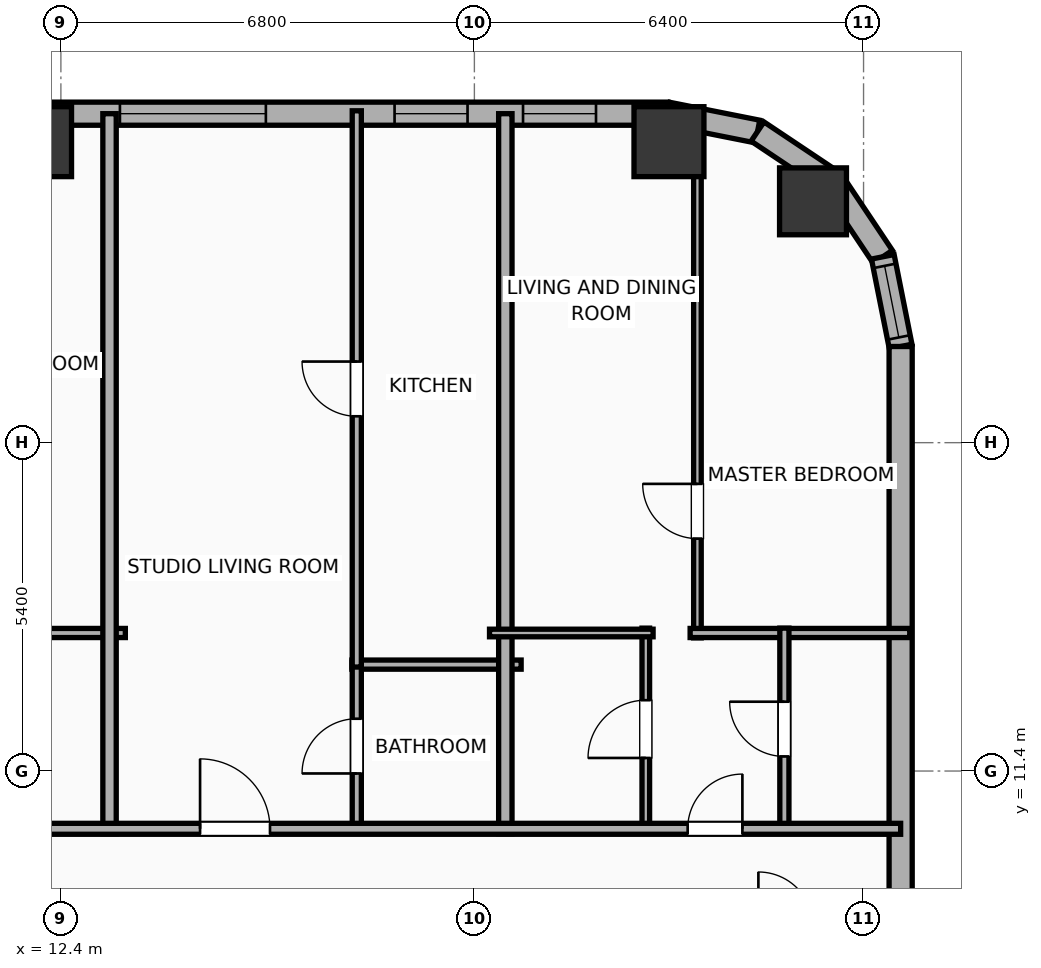
"""IFC4 building model, lengths in metres.
Left out: names, types, materials, properties, quantities, classifications, styles, units other than length and angle.
Written with IfcOpenShell. Run it as: python <this file> out.ifc"""

import sys

from ifc_helpers import new_model, si_unit, direction, frame, frame_2d, origin, origin_2d, place, context, subcontext, project, spatial, rectangle, hollow_rectangle, hollow_circle, extrude, element, fill, save


model = new_model("IFC4")
c1 = context("Model", 3, precision=1e-05, world=origin(), true_north=direction((0.0, 1.0)))
c2 = subcontext(c1, "Body", "Model", "MODEL_VIEW")
j1 = project(units=[si_unit("LENGTHUNIT", "METRE"), si_unit("PLANEANGLEUNIT", "RADIAN")], contexts=[c1])
p1 = place(None, origin())
s1 = spatial("IfcSite", under=j1, at=p1, CompositionType="ELEMENT")
p2 = place(p1, origin())
s2 = spatial("IfcBuilding", under=s1, at=p2, CompositionType="ELEMENT")
p3 = place(p2, frame((0.0, 0.0, 57.2)))
s3 = spatial("IfcBuildingStorey", under=s2, at=p3, CompositionType="ELEMENT", Elevation=57.2)
p4 = place(p3, frame((24.769, 20.769, 0.0), z_axis=(0.0, 0.0, 1.0), x_axis=(1.0, 0.0, 0.0)))
e1 = element("IfcColumn", 1, at=p4, inside=s3, PredefinedType="COLUMN", context=c2, shape_type="SweptSolid", body=[
    extrude(hollow_circle(Radius=0.55, WallThickness=0.036, at=origin_2d()), origin(), (0.0, 0.0, 1.0), 3.9),
])
for number, where, z_axis, x_axis in (
    (2, (22.4, 21.75, 0.0), (0.0, 0.0, 1.0), (1.0, 0.0, 0.0)),
    (3, (12.0, 21.75, 0.0), (0.0, 0.0, 1.0), (1.0, 0.0, 0.0)),
):
    element("IfcColumn", number, at=place(p3, frame(where, z_axis=z_axis, x_axis=x_axis)), inside=s3, PredefinedType="COLUMN", context=c2, shape_type="SweptSolid", body=[
        extrude(hollow_rectangle(XDim=1.15, YDim=1.15, WallThickness=0.04, at=origin_2d()), origin(), (0.0, 0.0, 1.0), 3.9),
    ])
p5 = place(p3, frame((-29.581, 22.21, 0.0), z_axis=(0.0, 0.0, 1.0), x_axis=(1.0, 0.0, 0.0)))
e4 = element("IfcWall", 4, at=p5, inside=s3, PredefinedType="ELEMENTEDWALL", context=c2, shape_type="SweptSolid", body=[
    extrude(rectangle(XDim=51.963, YDim=0.38, at=frame_2d((25.981, 0.0))), origin(), (0.0, 0.0, 1.0), 3.65),
])
p6 = place(p5, frame((6.61, 0.0, 0.75)))
e5 = element("IfcOpeningElement", 5, at=p6, cuts=e4, PredefinedType="OPENING", context=c2, shape_type="SweptSolid", body=[
    extrude(rectangle(XDim=2.4, YDim=2.1, at=frame_2d((1.2, 1.05))), frame((0.0, 0.2, 0.0), z_axis=(0.0, -1.0, 0.0), x_axis=(1.0, 0.0, 0.0)), (0.0, 0.0, 1.0), 0.4),
])
p7 = place(p5, frame((24.781, 0.0, 0.75)))
e6 = element("IfcOpeningElement", 6, at=p7, cuts=e4, PredefinedType="OPENING", context=c2, shape_type="SweptSolid", body=[
    extrude(rectangle(XDim=2.4, YDim=2.1, at=frame_2d((1.2, 1.05))), frame((0.0, 0.2, 0.0), z_axis=(0.0, -1.0, 0.0), x_axis=(1.0, 0.0, 0.0)), (0.0, 0.0, 1.0), 0.4),
])
p8 = place(p5, frame((42.952, 0.0, 0.75)))
e7 = element("IfcOpeningElement", 7, at=p8, cuts=e4, PredefinedType="OPENING", context=c2, shape_type="SweptSolid", body=[
    extrude(rectangle(XDim=2.4, YDim=2.1, at=frame_2d((1.2, 1.05))), frame((0.0, 0.2, 0.0), z_axis=(0.0, -1.0, 0.0), x_axis=(1.0, 0.0, 0.0)), (0.0, 0.0, 1.0), 0.4),
])
p9 = place(p5, frame((3.476, 0.0, 0.75)))
e8 = element("IfcOpeningElement", 8, at=p9, cuts=e4, PredefinedType="OPENING", context=c2, shape_type="SweptSolid", body=[
    extrude(rectangle(XDim=1.2, YDim=2.05, at=frame_2d((0.6, 1.025))), frame((0.0, 0.2, 0.0), z_axis=(0.0, -1.0, 0.0), x_axis=(1.0, 0.0, 0.0)), (0.0, 0.0, 1.0), 0.4),
])
p10 = place(p5, frame((11.236, 0.0, 0.75)))
e9 = element("IfcOpeningElement", 9, at=p10, cuts=e4, PredefinedType="OPENING", context=c2, shape_type="SweptSolid", body=[
    extrude(rectangle(XDim=1.2, YDim=2.05, at=frame_2d((0.6, 1.025))), frame((0.0, 0.2, 0.0), z_axis=(0.0, -1.0, 0.0), x_axis=(1.0, 0.0, 0.0)), (0.0, 0.0, 1.0), 0.4),
])
p11 = place(p5, frame((14.576, 0.0, 0.75)))
e10 = element("IfcOpeningElement", 10, at=p11, cuts=e4, PredefinedType="OPENING", context=c2, shape_type="SweptSolid", body=[
    extrude(rectangle(XDim=1.2, YDim=2.05, at=frame_2d((0.6, 1.025))), frame((0.0, 0.2, 0.0), z_axis=(0.0, -1.0, 0.0), x_axis=(1.0, 0.0, 0.0)), (0.0, 0.0, 1.0), 0.4),
])
p12 = place(p5, frame((18.276, 0.0, 0.75)))
e11 = element("IfcOpeningElement", 11, at=p12, cuts=e4, PredefinedType="OPENING", context=c2, shape_type="SweptSolid", body=[
    extrude(rectangle(XDim=1.2, YDim=2.05, at=frame_2d((0.6, 1.025))), frame((0.0, 0.2, 0.0), z_axis=(0.0, -1.0, 0.0), x_axis=(1.0, 0.0, 0.0)), (0.0, 0.0, 1.0), 0.4),
])
p13 = place(p5, frame((21.976, 0.0, 0.75)))
e12 = element("IfcOpeningElement", 12, at=p13, cuts=e4, PredefinedType="OPENING", context=c2, shape_type="SweptSolid", body=[
    extrude(rectangle(XDim=1.2, YDim=2.05, at=frame_2d((0.6, 1.025))), frame((0.0, 0.2, 0.0), z_axis=(0.0, -1.0, 0.0), x_axis=(1.0, 0.0, 0.0)), (0.0, 0.0, 1.0), 0.4),
])
p14 = place(p5, frame((29.136, 0.0, 0.75)))
e13 = element("IfcOpeningElement", 13, at=p14, cuts=e4, PredefinedType="OPENING", context=c2, shape_type="SweptSolid", body=[
    extrude(rectangle(XDim=1.2, YDim=2.05, at=frame_2d((0.6, 1.025))), frame((0.0, 0.2, 0.0), z_axis=(0.0, -1.0, 0.0), x_axis=(1.0, 0.0, 0.0)), (0.0, 0.0, 1.0), 0.4),
])
p15 = place(p5, frame((33.076, 0.0, 0.75)))
e14 = element("IfcOpeningElement", 14, at=p15, cuts=e4, PredefinedType="OPENING", context=c2, shape_type="SweptSolid", body=[
    extrude(rectangle(XDim=1.2, YDim=2.05, at=frame_2d((0.6, 1.025))), frame((0.0, 0.2, 0.0), z_axis=(0.0, -1.0, 0.0), x_axis=(1.0, 0.0, 0.0)), (0.0, 0.0, 1.0), 0.4),
])
p16 = place(p5, frame((36.776, 0.0, 0.75)))
e15 = element("IfcOpeningElement", 15, at=p16, cuts=e4, PredefinedType="OPENING", context=c2, shape_type="SweptSolid", body=[
    extrude(rectangle(XDim=1.2, YDim=2.05, at=frame_2d((0.6, 1.025))), frame((0.0, 0.2, 0.0), z_axis=(0.0, -1.0, 0.0), x_axis=(1.0, 0.0, 0.0)), (0.0, 0.0, 1.0), 0.4),
])
p17 = place(p5, frame((39.931, 0.0, 0.75)))
e16 = element("IfcOpeningElement", 16, at=p17, cuts=e4, PredefinedType="OPENING", context=c2, shape_type="SweptSolid", body=[
    extrude(rectangle(XDim=0.85, YDim=2.05, at=frame_2d((0.425, 1.025))), frame((0.0, 0.2, 0.0), z_axis=(0.0, -1.0, 0.0), x_axis=(1.0, 0.0, 0.0)), (0.0, 0.0, 1.0), 0.4),
])
p18 = place(p5, frame((47.469, 0.0, 0.75)))
e17 = element("IfcOpeningElement", 17, at=p18, cuts=e4, PredefinedType="OPENING", context=c2, shape_type="SweptSolid", body=[
    extrude(rectangle(XDim=1.2, YDim=2.05, at=frame_2d((0.6, 1.025))), frame((0.0, 0.2, 0.0), z_axis=(0.0, -1.0, 0.0), x_axis=(1.0, 0.0, 0.0)), (0.0, 0.0, 1.0), 0.4),
])
p19 = place(p5, frame((49.581, 0.0, 0.75)))
e18 = element("IfcOpeningElement", 18, at=p19, cuts=e4, PredefinedType="OPENING", context=c2, shape_type="SweptSolid", body=[
    extrude(rectangle(XDim=1.2, YDim=2.05, at=frame_2d((0.6, 1.025))), frame((0.0, 0.2, 0.0), z_axis=(0.0, -1.0, 0.0), x_axis=(1.0, 0.0, 0.0)), (0.0, 0.0, 1.0), 0.4),
])
p20 = place(p3, frame((22.381, 22.21, 0.0), z_axis=(0.0, 0.0, 1.0), x_axis=(0.980786132421, -0.195086038585, 0.0)))
e19 = element("IfcWall", 19, at=p20, inside=s3, PredefinedType="ELEMENTEDWALL", context=c2, shape_type="SweptSolid", body=[
    extrude(rectangle(XDim=1.504, YDim=0.38, at=frame_2d((0.752, 0.0))), origin(), (0.0, 0.0, 1.0), 3.65),
])
for number, where, z_axis, x_axis in (
    (20, (23.857, 21.917, 0.0), (0.0, 0.0, 1.0), (0.831, -0.556, 0.0)),
    (21, (25.091, 21.091, 0.0), (0.0, 0.0, 1.0), (0.556, -0.831, 0.0)),
):
    element("IfcWall", number, at=place(p3, frame(where, z_axis=z_axis, x_axis=x_axis)), inside=s3, PredefinedType="ELEMENTEDWALL", context=c2, shape_type="SweptSolid", body=[
        extrude(rectangle(XDim=1.485, YDim=0.38, at=frame_2d((0.743, 0.0))), origin(), (0.0, 0.0, 1.0), 3.65),
    ])
p21 = place(p3, frame((25.917, 19.857, 0.0), z_axis=(0.0, 0.0, 1.0), x_axis=(0.195086038585, -0.980786132421, 0.0)))
e22 = element("IfcWall", 22, at=p21, inside=s3, PredefinedType="ELEMENTEDWALL", context=c2, shape_type="SweptSolid", body=[
    extrude(rectangle(XDim=1.504, YDim=0.38, at=frame_2d((0.752, 0.0))), origin(), (0.0, 0.0, 1.0), 3.65),
])
p22 = place(p21, frame((0.152, 0.0, 0.75)))
e23 = element("IfcOpeningElement", 23, at=p22, cuts=e22, PredefinedType="OPENING", context=c2, shape_type="SweptSolid", body=[
    extrude(rectangle(XDim=1.2, YDim=2.05, at=frame_2d((0.6, 1.025))), frame((0.0, 0.2, 0.0), z_axis=(0.0, -1.0, 0.0), x_axis=(1.0, 0.0, 0.0)), (0.0, 0.0, 1.0), 0.4),
])
p23 = place(p3, frame((26.21, 18.381, 0.0), z_axis=(0.0, 0.0, 1.0), x_axis=(0.0, -1.0, 0.0)))
e24 = element("IfcWall", 24, at=p23, inside=s3, PredefinedType="ELEMENTEDWALL", context=c2, shape_type="SweptSolid", body=[
    extrude(rectangle(XDim=36.763, YDim=0.38, at=frame_2d((18.381, 0.0))), origin(), (0.0, 0.0, 1.0), 3.65),
])
p24 = place(p23, frame((33.362, 0.0, 0.75)))
e25 = element("IfcOpeningElement", 25, at=p24, cuts=e24, PredefinedType="OPENING", context=c2, shape_type="SweptSolid", body=[
    extrude(rectangle(XDim=1.2, YDim=2.05, at=frame_2d((0.6, 1.025))), frame((0.0, 0.2, 0.0), z_axis=(0.0, -1.0, 0.0), x_axis=(1.0, 0.0, 0.0)), (0.0, 0.0, 1.0), 0.4),
])
p25 = place(p3, frame((9.67, 13.67, 0.0), z_axis=(0.0, 0.0, 1.0), x_axis=(1.0, 0.0, 0.0)))
e26 = element("IfcWall", 26, at=p25, inside=s3, PredefinedType="PLUMBINGWALL", context=c2, shape_type="SweptSolid", body=[
    extrude(rectangle(XDim=3.79, YDim=0.15, at=frame_2d((1.895, 0.0))), origin(), (0.0, 0.0, 1.0), 3.65),
])
p26 = place(p3, frame((13.2, 10.37, 0.0), z_axis=(0.0, 0.0, 1.0), x_axis=(0.0, 1.0, 0.0)))
e27 = element("IfcWall", 27, at=p26, inside=s3, PredefinedType="PARTITIONING", context=c2, shape_type="SweptSolid", body=[
    extrude(rectangle(XDim=11.84, YDim=0.22, at=frame_2d((5.92, 0.0))), origin(), (0.0, 0.0, 1.0), 3.65),
])
p27 = place(p3, frame((17.186, 13.15, 0.0), z_axis=(0.0, 0.0, 1.0), x_axis=(1.0, 0.0, 0.0)))
e28 = element("IfcWall", 28, at=p27, inside=s3, PredefinedType="PLUMBINGWALL", context=c2, shape_type="SweptSolid", body=[
    extrude(rectangle(XDim=2.783, YDim=0.15, at=frame_2d((1.392, 0.0))), origin(), (0.0, 0.0, 1.0), 3.65),
])
p28 = place(p3, frame((17.266, 10.43, 0.0), z_axis=(0.0, 0.0, 1.0), x_axis=(0.0, 1.0, 0.0)))
e29 = element("IfcWall", 29, at=p28, inside=s3, PredefinedType="PLUMBINGWALL", context=c2, shape_type="SweptSolid", body=[
    extrude(rectangle(XDim=2.76, YDim=0.15, at=frame_2d((1.38, 0.0))), origin(), (0.0, 0.0, 1.0), 3.65),
])
p29 = place(p28, frame((0.93, 0.0, 0.0)))
e30 = element("IfcOpeningElement", 30, at=p29, cuts=e29, PredefinedType="OPENING", context=c2, shape_type="SweptSolid", body=[
    extrude(rectangle(XDim=0.9, YDim=2.05, at=frame_2d((0.45, 1.025))), frame((0.0, 0.085, 0.0), z_axis=(0.0, -1.0, 0.0), x_axis=(1.0, 0.0, 0.0)), (0.0, 0.0, 1.0), 0.17),
])
p30 = place(p3, frame((17.266, 13.11, 0.0), z_axis=(0.0, 0.0, 1.0), x_axis=(0.0, 1.0, 0.0)))
e31 = element("IfcWall", 31, at=p30, inside=s3, PredefinedType="PLUMBINGWALL", context=c2, shape_type="SweptSolid", body=[
    extrude(rectangle(XDim=9.147, YDim=0.15, at=frame_2d((4.574, 0.0))), origin(), (0.0, 0.0, 1.0), 3.65),
])
p31 = place(p30, frame((4.124, 0.0, 0.0)))
e32 = element("IfcOpeningElement", 32, at=p31, cuts=e31, PredefinedType="OPENING", context=c2, shape_type="SweptSolid", body=[
    extrude(rectangle(XDim=0.9, YDim=2.05, at=frame_2d((0.45, 1.025))), frame((0.0, 0.085, 0.0), z_axis=(0.0, -1.0, 0.0), x_axis=(1.0, 0.0, 0.0)), (0.0, 0.0, 1.0), 0.17),
])
p32 = place(p3, frame((19.709, 10.37, 0.0), z_axis=(0.0, 0.0, 1.0), x_axis=(0.0, 1.0, 0.0)))
e33 = element("IfcWall", 33, at=p32, inside=s3, PredefinedType="PARTITIONING", context=c2, shape_type="SweptSolid", body=[
    extrude(rectangle(XDim=11.84, YDim=0.22, at=frame_2d((5.92, 0.0))), origin(), (0.0, 0.0, 1.0), 3.65),
])
p33 = place(p3, frame((22.868, 13.59, 0.0), z_axis=(0.0, 0.0, 1.0), x_axis=(0.0, 1.0, 0.0)))
e34 = element("IfcWall", 34, at=p33, inside=s3, PredefinedType="PARTITIONING", context=c2, shape_type="SweptSolid", body=[
    extrude(rectangle(XDim=8.676, YDim=0.125, at=frame_2d((4.338, 0.0))), origin(), (0.0, 0.0, 1.0), 2.94),
])
p34 = place(p33, frame((1.632, 0.0, 0.0)))
e35 = element("IfcOpeningElement", 35, at=p34, cuts=e34, PredefinedType="OPENING", context=c2, shape_type="SweptSolid", body=[
    extrude(rectangle(XDim=0.9, YDim=2.05, at=frame_2d((0.45, 1.025))), frame((0.0, 0.073, 0.0), z_axis=(0.0, -1.0, 0.0), x_axis=(1.0, 0.0, 0.0)), (0.0, 0.0, 1.0), 0.145),
])
p35 = place(p3, frame((22.748, 13.67, 0.0), z_axis=(0.0, 0.0, 1.0), x_axis=(1.0, 0.0, 0.0)))
e36 = element("IfcWall", 36, at=p35, inside=s3, PredefinedType="PLUMBINGWALL", context=c2, shape_type="SweptSolid", body=[
    extrude(rectangle(XDim=3.612, YDim=0.15, at=frame_2d((1.806, 0.0))), origin(), (0.0, 0.0, 1.0), 3.65),
])
p36 = place(p3, frame((22.019, 10.43, 0.0), z_axis=(0.0, 0.0, 1.0), x_axis=(0.0, 1.0, 0.0)))
e37 = element("IfcWall", 37, at=p36, inside=s3, PredefinedType="PARTITIONING", context=c2, shape_type="SweptSolid", body=[
    extrude(rectangle(XDim=3.32, YDim=0.125, at=frame_2d((1.66, 0.0))), origin(), (0.0, 0.0, 1.0), 3.65),
])
p37 = place(p36, frame((1.185, 0.0, 0.0)))
e38 = element("IfcOpeningElement", 38, at=p37, cuts=e37, PredefinedType="OPENING", context=c2, shape_type="SweptSolid", body=[
    extrude(rectangle(XDim=0.95, YDim=2.05, at=frame_2d((0.475, 1.025))), frame((0.0, 0.073, 0.0), z_axis=(0.0, -1.0, 0.0), x_axis=(1.0, 0.0, 0.0)), (0.0, 0.0, 1.0), 0.145),
])
p38 = place(p3, frame((19.449, 13.67, 0.0), z_axis=(0.0, 0.0, 1.0), x_axis=(1.0, 0.0, 0.0)))
e39 = element("IfcWall", 39, at=p38, inside=s3, PredefinedType="PARTITIONING", context=c2, shape_type="SweptSolid", body=[
    extrude(rectangle(XDim=2.69, YDim=0.125, at=frame_2d((1.345, 0.0))), origin(), (0.0, 0.0, 1.0), 3.65),
])
p39 = place(p3, frame((24.298, 10.43, 0.0), z_axis=(0.0, 0.0, 1.0), x_axis=(0.0, 1.0, 0.0)))
e40 = element("IfcWall", 40, at=p39, inside=s3, PredefinedType="PLUMBINGWALL", context=c2, shape_type="SweptSolid", body=[
    extrude(rectangle(XDim=3.32, YDim=0.15, at=frame_2d((1.66, 0.0))), origin(), (0.0, 0.0, 1.0), 3.65),
])
p40 = place(p39, frame((1.21, 0.0, 0.0)))
e41 = element("IfcOpeningElement", 41, at=p40, cuts=e40, PredefinedType="OPENING", context=c2, shape_type="SweptSolid", body=[
    extrude(rectangle(XDim=0.9, YDim=2.05, at=frame_2d((0.45, 1.025))), frame((0.0, 0.085, 0.0), z_axis=(0.0, -1.0, 0.0), x_axis=(1.0, 0.0, 0.0)), (0.0, 0.0, 1.0), 0.17),
])
p41 = place(p3, frame((-33.41, 10.45, 0.0), z_axis=(0.0, 0.0, 1.0), x_axis=(1.0, 0.0, 0.0)))
e42 = element("IfcWall", 42, at=p41, inside=s3, PredefinedType="PARTITIONING", context=c2, shape_type="SweptSolid", body=[
    extrude(rectangle(XDim=59.62, YDim=0.18, at=frame_2d((29.81, 0.0))), origin(), (0.0, 0.0, 1.0), 3.65),
])
p42 = place(p41, frame((4.529, 0.0, 0.0)))
e43 = element("IfcOpeningElement", 43, at=p42, cuts=e42, PredefinedType="OPENING", context=c2, shape_type="SweptSolid", body=[
    extrude(rectangle(XDim=1.15, YDim=2.05, at=frame_2d((0.575, 1.025))), frame((0.0, 0.1, 0.0), z_axis=(0.0, -1.0, 0.0), x_axis=(1.0, 0.0, 0.0)), (0.0, 0.0, 1.0), 0.2),
])
p43 = place(p41, frame((12.899, 0.0, 0.0)))
e44 = element("IfcOpeningElement", 44, at=p43, cuts=e42, PredefinedType="OPENING", context=c2, shape_type="SweptSolid", body=[
    extrude(rectangle(XDim=1.15, YDim=2.05, at=frame_2d((0.575, 1.025))), frame((0.0, 0.1, 0.0), z_axis=(0.0, -1.0, 0.0), x_axis=(1.0, 0.0, 0.0)), (0.0, 0.0, 1.0), 0.2),
])
p44 = place(p41, frame((20.298, 0.0, 0.0)))
e45 = element("IfcOpeningElement", 45, at=p44, cuts=e42, PredefinedType="OPENING", context=c2, shape_type="SweptSolid", body=[
    extrude(rectangle(XDim=1.15, YDim=2.05, at=frame_2d((0.575, 1.025))), frame((0.0, 0.1, 0.0), z_axis=(0.0, -1.0, 0.0), x_axis=(1.0, 0.0, 0.0)), (0.0, 0.0, 1.0), 0.2),
])
p45 = place(p41, frame((27.703, 0.0, 0.0)))
e46 = element("IfcOpeningElement", 46, at=p45, cuts=e42, PredefinedType="OPENING", context=c2, shape_type="SweptSolid", body=[
    extrude(rectangle(XDim=1.15, YDim=2.05, at=frame_2d((0.575, 1.025))), frame((0.0, 0.1, 0.0), z_axis=(0.0, -1.0, 0.0), x_axis=(1.0, 0.0, 0.0)), (0.0, 0.0, 1.0), 0.2),
])
p46 = place(p41, frame((35.102, 0.0, 0.0)))
e47 = element("IfcOpeningElement", 47, at=p46, cuts=e42, PredefinedType="OPENING", context=c2, shape_type="SweptSolid", body=[
    extrude(rectangle(XDim=1.15, YDim=2.05, at=frame_2d((0.575, 1.025))), frame((0.0, 0.1, 0.0), z_axis=(0.0, -1.0, 0.0), x_axis=(1.0, 0.0, 0.0)), (0.0, 0.0, 1.0), 0.2),
])
p47 = place(p41, frame((42.5, 0.0, 0.0)))
e48 = element("IfcOpeningElement", 48, at=p47, cuts=e42, PredefinedType="OPENING", context=c2, shape_type="SweptSolid", body=[
    extrude(rectangle(XDim=1.15, YDim=2.05, at=frame_2d((0.575, 1.025))), frame((0.0, 0.1, 0.0), z_axis=(0.0, -1.0, 0.0), x_axis=(1.0, 0.0, 0.0)), (0.0, 0.0, 1.0), 0.2),
])
p48 = place(p41, frame((48.099, 0.0, 0.0)))
e49 = element("IfcOpeningElement", 49, at=p48, cuts=e42, PredefinedType="OPENING", context=c2, shape_type="SweptSolid", body=[
    extrude(rectangle(XDim=1.15, YDim=2.05, at=frame_2d((0.575, 1.025))), frame((0.0, 0.1, 0.0), z_axis=(0.0, -1.0, 0.0), x_axis=(1.0, 0.0, 0.0)), (0.0, 0.0, 1.0), 0.2),
])
p49 = place(p41, frame((56.117, 0.0, 0.0)))
e50 = element("IfcOpeningElement", 50, at=p49, cuts=e42, PredefinedType="OPENING", context=c2, shape_type="SweptSolid", body=[
    extrude(rectangle(XDim=0.9, YDim=2.05, at=frame_2d((0.45, 1.025))), frame((0.0, 0.1, 0.0), z_axis=(0.0, -1.0, 0.0), x_axis=(1.0, 0.0, 0.0)), (0.0, 0.0, 1.0), 0.2),
])
p50 = place(p8, origin())
e51 = element("IfcWindow", 51, at=p50, inside=s3, PartitioningType="SINGLE_PANEL", PredefinedType="WINDOW", context=c2, shape_type="SweptSolid", body=[
    extrude(rectangle(XDim=2.4, YDim=2.1, at=frame_2d((1.2, 1.05))), frame((0.0, 0.03, 0.0), z_axis=(0.0, -1.0, 0.0), x_axis=(1.0, 0.0, 0.0)), (0.0, 0.0, 1.0), 0.06),
])
fill(e7, e51)
p51 = place(p18, origin())
e52 = element("IfcWindow", 52, at=p51, inside=s3, PartitioningType="SINGLE_PANEL", PredefinedType="WINDOW", context=c2, shape_type="SweptSolid", body=[
    extrude(rectangle(XDim=1.2, YDim=2.05, at=frame_2d((0.6, 1.025))), frame((0.0, 0.03, 0.0), z_axis=(0.0, -1.0, 0.0), x_axis=(1.0, 0.0, 0.0)), (0.0, 0.0, 1.0), 0.06),
])
fill(e17, e52)
p52 = place(p19, origin())
e53 = element("IfcWindow", 53, at=p52, inside=s3, PartitioningType="SINGLE_PANEL", PredefinedType="WINDOW", context=c2, shape_type="SweptSolid", body=[
    extrude(rectangle(XDim=1.2, YDim=2.05, at=frame_2d((0.6, 1.025))), frame((0.0, 0.03, 0.0), z_axis=(0.0, -1.0, 0.0), x_axis=(1.0, 0.0, 0.0)), (0.0, 0.0, 1.0), 0.06),
])
fill(e18, e53)
p53 = place(p22, origin())
e54 = element("IfcWindow", 54, at=p53, inside=s3, PartitioningType="SINGLE_PANEL", PredefinedType="WINDOW", context=c2, shape_type="SweptSolid", body=[
    extrude(rectangle(XDim=1.2, YDim=2.05, at=frame_2d((0.6, 1.025))), frame((0.0, 0.03, 0.0), z_axis=(0.0, -1.0, 0.0), x_axis=(1.0, 0.0, 0.0)), (0.0, 0.0, 1.0), 0.06),
])
fill(e23, e54)
p54 = place(p29, origin())
e55 = element("IfcDoor", 55, at=p54, inside=s3, OperationType="SINGLE_SWING_LEFT", PredefinedType="DOOR", context=c2, shape_type="SweptSolid", body=[
    extrude(rectangle(XDim=0.9, YDim=2.05, at=frame_2d((0.45, 1.025))), frame((0.0, 0.025, 0.0), z_axis=(0.0, -1.0, 0.0), x_axis=(1.0, 0.0, 0.0)), (0.0, 0.0, 1.0), 0.05),
])
fill(e30, e55)
p55 = place(p31, origin())
e56 = element("IfcDoor", 56, at=p55, inside=s3, OperationType="SINGLE_SWING_RIGHT", PredefinedType="DOOR", context=c2, shape_type="SweptSolid", body=[
    extrude(rectangle(XDim=0.9, YDim=2.05, at=frame_2d((0.45, 1.025))), frame((0.0, 0.025, 0.0), z_axis=(0.0, -1.0, 0.0), x_axis=(1.0, 0.0, 0.0)), (0.0, 0.0, 1.0), 0.05),
])
fill(e32, e56)
p56 = place(p34, origin())
e57 = element("IfcDoor", 57, at=p56, inside=s3, OperationType="SINGLE_SWING_RIGHT", PredefinedType="DOOR", context=c2, shape_type="SweptSolid", body=[
    extrude(rectangle(XDim=0.9, YDim=2.05, at=frame_2d((0.45, 1.025))), frame((0.0, 0.025, 0.0), z_axis=(0.0, -1.0, 0.0), x_axis=(1.0, 0.0, 0.0)), (0.0, 0.0, 1.0), 0.05),
])
fill(e35, e57)
p57 = place(p37, origin())
e58 = element("IfcDoor", 58, at=p57, inside=s3, OperationType="SINGLE_SWING_LEFT", PredefinedType="DOOR", context=c2, shape_type="SweptSolid", body=[
    extrude(rectangle(XDim=0.95, YDim=2.05, at=frame_2d((0.475, 1.025))), frame((0.0, 0.025, 0.0), z_axis=(0.0, -1.0, 0.0), x_axis=(1.0, 0.0, 0.0)), (0.0, 0.0, 1.0), 0.05),
])
fill(e38, e58)
p58 = place(p40, origin())
e59 = element("IfcDoor", 59, at=p58, inside=s3, OperationType="SINGLE_SWING_RIGHT", PredefinedType="DOOR", context=c2, shape_type="SweptSolid", body=[
    extrude(rectangle(XDim=0.9, YDim=2.05, at=frame_2d((0.45, 1.025))), frame((0.0, 0.025, 0.0), z_axis=(0.0, -1.0, 0.0), x_axis=(1.0, 0.0, 0.0)), (0.0, 0.0, 1.0), 0.05),
])
fill(e41, e59)
p59 = place(p48, origin())
e60 = element("IfcDoor", 60, at=p59, inside=s3, OperationType="SINGLE_SWING_LEFT", PredefinedType="DOOR", context=c2, shape_type="SweptSolid", body=[
    extrude(rectangle(XDim=1.15, YDim=2.05, at=frame_2d((0.575, 1.025))), frame((0.0, 0.025, 0.0), z_axis=(0.0, -1.0, 0.0), x_axis=(1.0, 0.0, 0.0)), (0.0, 0.0, 1.0), 0.05),
])
fill(e49, e60)
p60 = place(p49, origin())
e61 = element("IfcDoor", 61, at=p60, inside=s3, OperationType="SINGLE_SWING_RIGHT", PredefinedType="DOOR", context=c2, shape_type="SweptSolid", body=[
    extrude(rectangle(XDim=0.9, YDim=2.05, at=frame_2d((0.45, 1.025))), frame((0.0, 0.025, 0.0), z_axis=(0.0, -1.0, 0.0), x_axis=(1.0, 0.0, 0.0)), (0.0, 0.0, 1.0), 0.05),
])
fill(e50, e61)
save(model, sys.argv[1])
